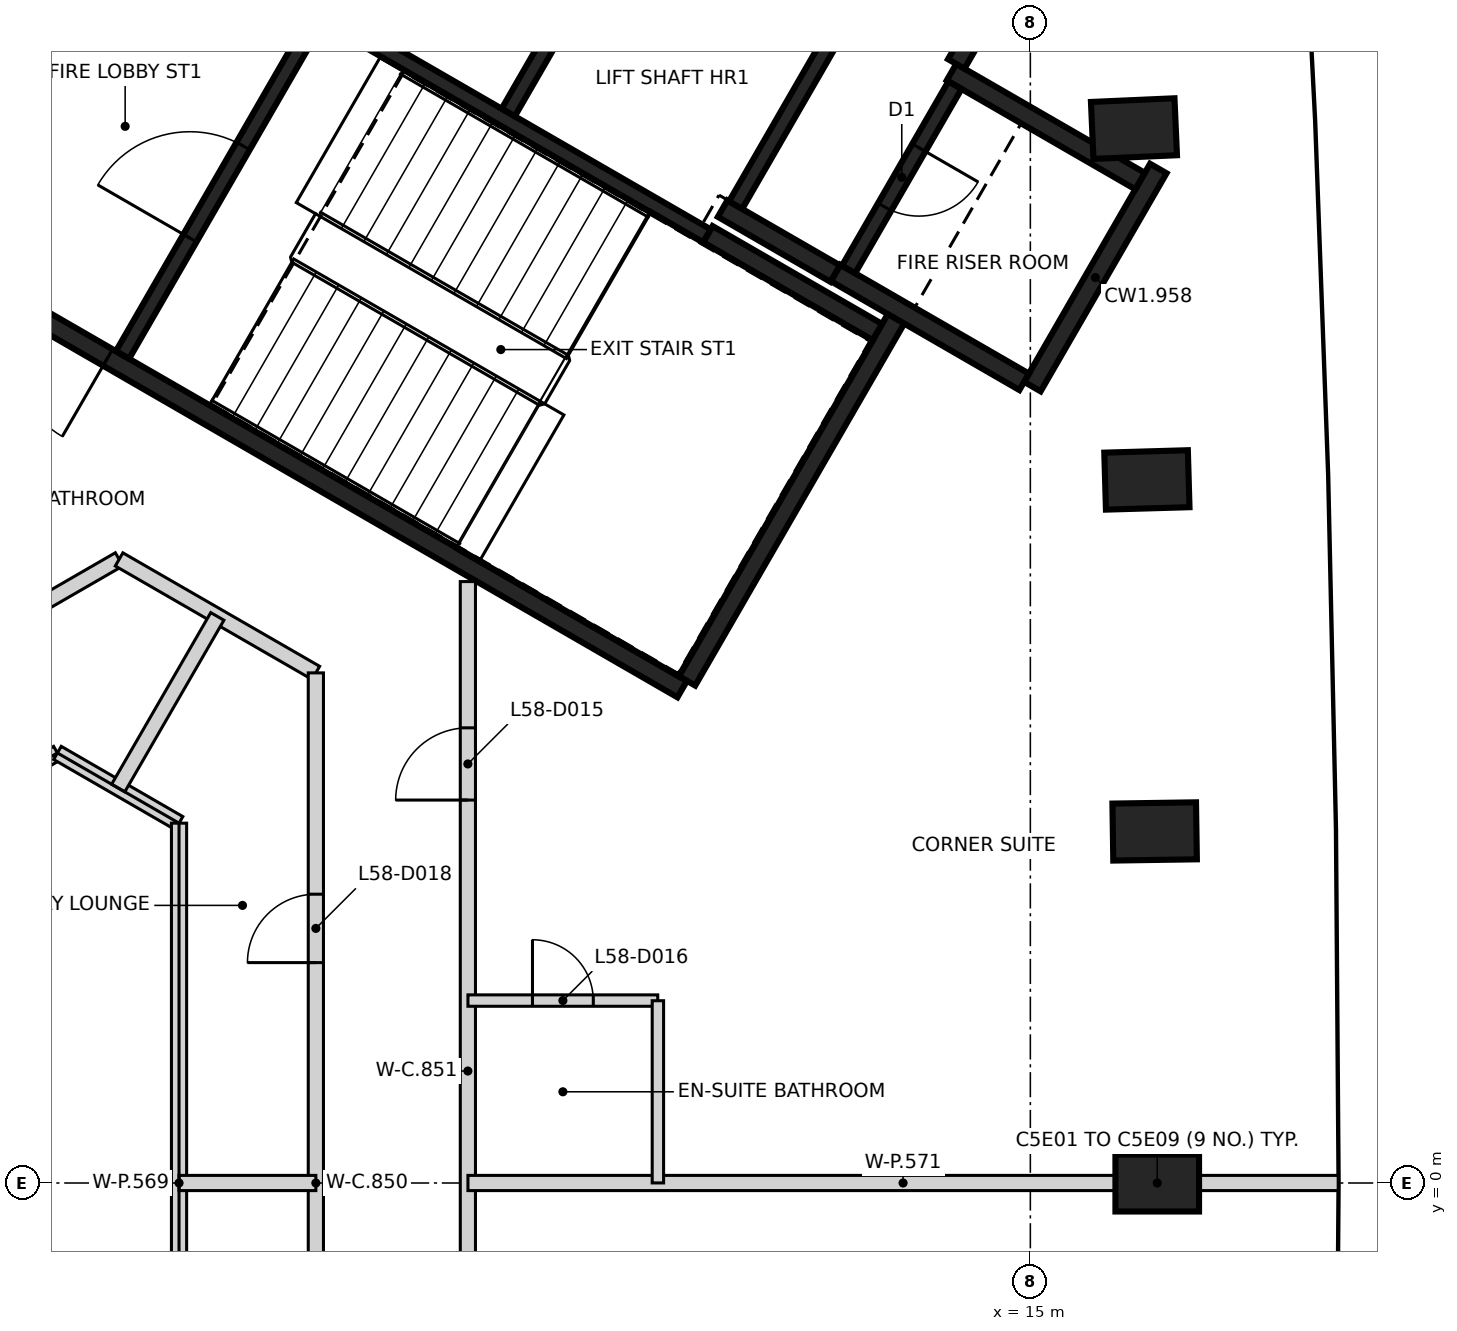
"""IFC4 building model, lengths in metres.
Left out: names, types, materials, properties, quantities, classifications, styles, units other than length and angle.
Written with IfcOpenShell. Run it as: python <this file> out.ifc"""

import sys

from ifc_helpers import new_model, si_unit, direction, frame, frame_2d, origin, origin_2d, place, context, subcontext, project, spatial, rectangle, extrude, element, fill, save


model = new_model("IFC4")
c1 = context("Model", 3, precision=1e-05, world=origin(), true_north=direction((0.0, 1.0)))
c2 = subcontext(c1, "Body", "Model", "MODEL_VIEW")
j1 = project(units=[si_unit("LENGTHUNIT", "METRE"), si_unit("PLANEANGLEUNIT", "RADIAN")], contexts=[c1])
p1 = place(None, origin())
s1 = spatial("IfcSite", under=j1, at=p1, CompositionType="ELEMENT")
p2 = place(p1, origin())
s2 = spatial("IfcBuilding", under=s1, at=p2, CompositionType="ELEMENT")
p3 = place(p2, frame((0.0, 0.0, 232.2)))
s3 = spatial("IfcBuildingStorey", under=s2, at=p3, CompositionType="ELEMENT", Elevation=232.2)
for number, where, z_axis, x_axis in (
    (1, (16.669, 0.0, -0.35), (0.0, 0.0, 1.0), (1.0, 0.0, 0.0)),
    (2, (16.635, 4.625, -0.35), (0.0, 0.0, 1.0), (1.0, 0.015, 0.0)),
    (3, (16.533, 9.25, -0.35), (0.0, 0.0, 1.0), (1.0, 0.029, 0.0)),
    (4, (16.363, 13.872, -0.35), (0.0, 0.0, 1.0), (0.999, 0.044, 0.0)),
):
    element("IfcColumn", number, at=place(p3, frame(where, z_axis=z_axis, x_axis=x_axis)), inside=s3, PredefinedType="COLUMN", context=c2, shape_type="SweptSolid", body=[
        extrude(rectangle(XDim=1.1, YDim=0.75, at=origin_2d()), origin(), (0.0, 0.0, 1.0), 3.6),
    ])
p4 = place(p3, frame((10.42, 6.498, 0.0), z_axis=(0.0, 0.0, 1.0), x_axis=(-0.866021906294, 0.500006057782, 0.0)))
e5 = element("IfcWall", 5, at=p4, inside=s3, PredefinedType="SHEAR", context=c2, shape_type="SweptSolid", body=[
    extrude(rectangle(XDim=11.55, YDim=0.25, at=frame_2d((5.775, 0.0))), origin(), (0.0, 0.0, 1.0), 3.25),
])
p5 = place(p4, frame((10.025, 0.0, 0.0)))
e6 = element("IfcOpeningElement", 6, at=p5, cuts=e5, PredefinedType="OPENING", context=c2, shape_type="SweptSolid", body=[
    extrude(rectangle(XDim=1.2, YDim=2.1, at=frame_2d((0.6, 1.05))), frame((0.0, 0.135, 0.0), z_axis=(0.0, -1.0, 0.0), x_axis=(1.0, 0.0, 0.0)), (0.0, 0.0, 1.0), 0.27),
])
p6 = place(p4, frame((8.725, 0.0, 0.0)))
e7 = element("IfcOpeningElement", 7, at=p6, cuts=e5, PredefinedType="OPENING", context=c2, shape_type="SweptSolid", body=[
    extrude(rectangle(XDim=1.2, YDim=2.1, at=frame_2d((0.6, 1.05))), frame((0.0, 0.135, 0.0), z_axis=(0.0, -1.0, 0.0), x_axis=(1.0, 0.0, 0.0)), (0.0, 0.0, 1.0), 0.27),
])
p7 = place(p3, frame((0.48, 12.381, 0.0), z_axis=(0.0, 0.0, 1.0), x_axis=(0.49999885962, 0.866026062182, 0.0)))
e8 = element("IfcWall", 8, at=p7, inside=s3, PredefinedType="SHEAR", context=c2, shape_type="SweptSolid", body=[
    extrude(rectangle(XDim=5.225, YDim=0.25, at=frame_2d((2.612, 0.0))), origin(), (0.0, 0.0, 1.0), 3.25),
])
p8 = place(p3, frame((13.238, 11.378, 0.0), z_axis=(0.0, 0.0, 1.0), x_axis=(-0.500008851346, -0.866020293397, 0.0)))
e9 = element("IfcWall", 9, at=p8, inside=s3, PredefinedType="SHEAR", context=c2, shape_type="SweptSolid", body=[
    extrude(rectangle(XDim=5.51, YDim=0.25, at=frame_2d((2.755, 0.0))), origin(), (0.0, 0.0, 1.0), 3.25),
])
p9 = place(p3, frame((16.684, 13.347, 0.0), z_axis=(0.0, 0.0, 1.0), x_axis=(-0.499998874531, -0.866026053573, 0.0)))
e10 = element("IfcWall", 10, at=p9, inside=s3, PredefinedType="SHEAR", context=c2, shape_type="SweptSolid", body=[
    extrude(rectangle(XDim=3.313, YDim=0.25, at=frame_2d((1.656, 0.0))), origin(), (0.0, 0.0, 1.0), 3.25),
])
p10 = place(p3, frame((14.918, 10.54, 0.0), z_axis=(0.0, 0.0, 1.0), x_axis=(-0.866063538972, 0.499933942099, 0.0)))
e11 = element("IfcWall", 11, at=p10, inside=s3, PredefinedType="SHEAR", context=c2, shape_type="SweptSolid", body=[
    extrude(rectangle(XDim=2.865, YDim=0.25, at=frame_2d((1.432, 0.0))), origin(), (0.0, 0.0, 1.0), 3.25),
])
p11 = place(p3, frame((13.963, 14.614, 0.0), z_axis=(0.0, 0.0, 1.0), x_axis=(0.866042235819, -0.499970844928, 0.0)))
e12 = element("IfcWall", 12, at=p11, inside=s3, PredefinedType="SHEAR", context=c2, shape_type="SweptSolid", body=[
    extrude(rectangle(XDim=2.865, YDim=0.25, at=frame_2d((1.432, 0.0))), origin(), (0.0, 0.0, 1.0), 3.25),
])
p12 = place(p3, frame((10.757, 12.481, 0.0), z_axis=(0.0, 0.0, 1.0), x_axis=(0.866022940537, -0.500004266446, 0.0)))
e13 = element("IfcWall", 13, at=p12, inside=s3, PredefinedType="SHEAR", context=c2, shape_type="SweptSolid", body=[
    extrude(rectangle(XDim=2.575, YDim=0.25, at=frame_2d((1.287, 0.0))), origin(), (0.0, 0.0, 1.0), 3.25),
])
p13 = place(p3, frame((12.433, 11.964, 0.0), z_axis=(0.0, 0.0, 1.0), x_axis=(-0.866038183914, 0.499977863513, 0.0)))
e14 = element("IfcWall", 14, at=p13, inside=s3, PredefinedType="SHEAR", context=c2, shape_type="SweptSolid", body=[
    extrude(rectangle(XDim=1.71, YDim=0.25, at=frame_2d((0.855, 0.0))), origin(), (0.0, 0.0, 1.0), 3.25),
])
p14 = place(p3, frame((14.305, 15.207, 0.0), z_axis=(0.0, 0.0, 1.0), x_axis=(-0.499848422343, -0.866112899501, 0.0)))
e15 = element("IfcWall", 15, at=p14, inside=s3, PredefinedType="SHEAR", context=c2, shape_type="SweptSolid", body=[
    extrude(rectangle(XDim=0.559, YDim=0.25, at=frame_2d((0.28, 0.0))), origin(), (0.0, 0.0, 1.0), 3.25),
])
p15 = place(p3, frame((10.743, 12.46, 0.0), z_axis=(0.0, 0.0, 1.0), x_axis=(-0.866018848283, 0.500011354289, 0.0)))
e16 = element("IfcWall", 16, at=p15, inside=s3, PredefinedType="SHEAR", context=c2, shape_type="SweptSolid", body=[
    extrude(rectangle(XDim=5.974, YDim=0.2, at=frame_2d((2.987, 0.0))), origin(), (0.0, 0.0, 1.0), 3.25),
])
p16 = place(p3, frame((3.057, 10.895, 0.0), z_axis=(0.0, 0.0, 1.0), x_axis=(0.500027839223, 0.866009330205, 0.0)))
e17 = element("IfcWall", 17, at=p16, inside=s3, PredefinedType="SHEAR", context=c2, shape_type="SweptSolid", body=[
    extrude(rectangle(XDim=5.098, YDim=0.2, at=frame_2d((2.549, 0.0))), origin(), (0.0, 0.0, 1.0), 3.25),
])
p17 = place(p16, frame((1.774, 0.0, 0.0)))
e18 = element("IfcOpeningElement", 18, at=p17, cuts=e17, PredefinedType="OPENING", context=c2, shape_type="SweptSolid", body=[
    extrude(rectangle(XDim=1.4, YDim=2.1, at=frame_2d((0.7, 1.05))), frame((0.0, 0.11, 0.0), z_axis=(0.0, -1.0, 0.0), x_axis=(1.0, 0.0, 0.0)), (0.0, 0.0, 1.0), 0.22),
])
p18 = place(p3, frame((8.132, 14.084, 0.0), z_axis=(0.0, 0.0, 1.0), x_axis=(0.500030834389, 0.86600760081, 0.0)))
e19 = element("IfcWall", 19, at=p18, inside=s3, PredefinedType="SHEAR", context=c2, shape_type="SweptSolid", body=[
    extrude(rectangle(XDim=3.198, YDim=0.2, at=frame_2d((1.599, 0.0))), origin(), (0.0, 0.0, 1.0), 3.25),
])
p19 = place(p3, frame((14.008, 14.442, 0.0), z_axis=(0.0, 0.0, 1.0), x_axis=(-0.499986818241, -0.866033014143, 0.0)))
e20 = element("IfcWall", 20, at=p19, inside=s3, PredefinedType="SHEAR", context=c2, shape_type="SweptSolid", body=[
    extrude(rectangle(XDim=2.798, YDim=0.2, at=frame_2d((1.399, 0.0))), origin(), (0.0, 0.0, 1.0), 3.25),
])
p20 = place(p19, frame((0.949, 0.0, 0.0)))
e21 = element("IfcOpeningElement", 21, at=p20, cuts=e20, PredefinedType="OPENING", context=c2, shape_type="SweptSolid", body=[
    extrude(rectangle(XDim=0.9, YDim=2.1, at=frame_2d((0.45, 1.05))), frame((0.0, 0.11, 0.0), z_axis=(0.0, -1.0, 0.0), x_axis=(1.0, 0.0, 0.0)), (0.0, 0.0, 1.0), 0.22),
])
p21 = place(p3, frame((12.502, 15.255, 0.0), z_axis=(0.0, 0.0, 1.0), x_axis=(-0.499965018551, -0.866045599391, 0.0)))
e22 = element("IfcWall", 22, at=p21, inside=s3, PredefinedType="SHEAR", context=c2, shape_type="SweptSolid", body=[
    extrude(rectangle(XDim=2.759, YDim=0.2, at=frame_2d((1.379, 0.0))), origin(), (0.0, 0.0, 1.0), 3.25),
])
p22 = place(p3, frame((-8.612, 1.494, 0.0), z_axis=(0.0, 0.0, 1.0), x_axis=(0.8660441356, 0.49996755414, 0.0)))
e23 = element("IfcWall", 23, at=p22, inside=s3, PredefinedType="PARTITIONING", context=c2, shape_type="SweptSolid", body=[
    extrude(rectangle(XDim=13.422, YDim=0.2, at=frame_2d((6.711, 0.0))), origin(), (0.0, 0.0, 1.0), 3.25),
])
p23 = place(p22, frame((9.611, 0.0, 0.0)))
e24 = element("IfcOpeningElement", 24, at=p23, cuts=e23, PredefinedType="OPENING", context=c2, shape_type="SweptSolid", body=[
    extrude(rectangle(XDim=0.9, YDim=2.1, at=frame_2d((0.45, 1.05))), frame((0.0, 0.11, 0.0), z_axis=(0.0, -1.0, 0.0), x_axis=(1.0, 0.0, 0.0)), (0.0, 0.0, 1.0), 0.22),
])
p24 = place(p22, frame((2.911, 0.0, 0.0)))
e25 = element("IfcOpeningElement", 25, at=p24, cuts=e23, PredefinedType="OPENING", context=c2, shape_type="SweptSolid", body=[
    extrude(rectangle(XDim=0.9, YDim=2.1, at=frame_2d((0.45, 1.05))), frame((0.0, 0.11, 0.0), z_axis=(0.0, -1.0, 0.0), x_axis=(1.0, 0.0, 0.0)), (0.0, 0.0, 1.0), 0.22),
])
p25 = place(p3, frame((-1.084, 12.65, 0.0), z_axis=(0.0, 0.0, 1.0), x_axis=(0.492373019537, 0.87038428848, 0.0)))
e26 = element("IfcWall", 26, at=p25, inside=s3, PredefinedType="PARTITIONING", context=c2, shape_type="SweptSolid", body=[
    extrude(rectangle(XDim=8.738, YDim=0.2, at=frame_2d((4.369, 0.0))), origin(), (0.0, 0.0, 1.0), 3.25),
])
p26 = place(p25, frame((5.23, 0.0, 0.0)))
e27 = element("IfcOpeningElement", 27, at=p26, cuts=e26, PredefinedType="OPENING", context=c2, shape_type="SweptSolid", body=[
    extrude(rectangle(XDim=1.0, YDim=2.1, at=frame_2d((0.5, 1.05))), frame((0.0, 0.11, 0.0), z_axis=(0.0, -1.0, 0.0), x_axis=(1.0, 0.0, 0.0)), (0.0, 0.0, 1.0), 0.22),
])
p27 = place(p3, frame((3.011, 8.204, 0.0), z_axis=(0.0, 0.0, 1.0), x_axis=(0.86628077395, -0.499557424812, 0.0)))
e28 = element("IfcWall", 28, at=p27, inside=s3, PredefinedType="PARTITIONING", context=c2, shape_type="SweptSolid", body=[
    extrude(rectangle(XDim=2.989, YDim=0.2, at=frame_2d((1.494, 0.0))), origin(), (0.0, 0.0, 1.0), 3.25),
])
p28 = place(p3, frame((5.6, -6.711, 0.0), z_axis=(0.0, 0.0, 1.0), x_axis=(0.0, 1.0, 0.0)))
e29 = element("IfcWall", 29, at=p28, inside=s3, PredefinedType="PARTITIONING", context=c2, shape_type="SweptSolid", body=[
    extrude(rectangle(XDim=13.422, YDim=0.2, at=frame_2d((6.711, 0.0))), origin(), (0.0, 0.0, 1.0), 3.25),
])
p29 = place(p28, frame((2.912, 0.0, 0.0)))
e30 = element("IfcOpeningElement", 30, at=p29, cuts=e29, PredefinedType="OPENING", context=c2, shape_type="SweptSolid", body=[
    extrude(rectangle(XDim=0.9, YDim=2.1, at=frame_2d((0.45, 1.05))), frame((0.0, 0.11, 0.0), z_axis=(0.0, -1.0, 0.0), x_axis=(1.0, 0.0, 0.0)), (0.0, 0.0, 1.0), 0.22),
])
p30 = place(p28, frame((9.611, 0.0, 0.0)))
e31 = element("IfcOpeningElement", 31, at=p30, cuts=e29, PredefinedType="OPENING", context=c2, shape_type="SweptSolid", body=[
    extrude(rectangle(XDim=0.9, YDim=2.1, at=frame_2d((0.45, 1.05))), frame((0.0, 0.11, 0.0), z_axis=(0.0, -1.0, 0.0), x_axis=(1.0, 0.0, 0.0)), (0.0, 0.0, 1.0), 0.22),
])
p31 = place(p3, frame((7.6, -4.966, 0.0), z_axis=(0.0, 0.0, 1.0), x_axis=(0.0, 1.0, 0.0)))
e32 = element("IfcWall", 32, at=p31, inside=s3, PredefinedType="PARTITIONING", context=c2, shape_type="SweptSolid", body=[
    extrude(rectangle(XDim=12.878, YDim=0.2, at=frame_2d((6.439, 0.0))), origin(), (0.0, 0.0, 1.0), 3.25),
])
p32 = place(p31, frame((10.004, 0.0, 0.0)))
e33 = element("IfcOpeningElement", 33, at=p32, cuts=e32, PredefinedType="OPENING", context=c2, shape_type="SweptSolid", body=[
    extrude(rectangle(XDim=0.95, YDim=2.1, at=frame_2d((0.475, 1.05))), frame((0.0, 0.11, 0.0), z_axis=(0.0, -1.0, 0.0), x_axis=(1.0, 0.0, 0.0)), (0.0, 0.0, 1.0), 0.22),
])
p33 = place(p3, frame((-6.0, -0.924, 0.0), z_axis=(0.0, 0.0, 1.0), x_axis=(0.866223755075, -0.499656288007, 0.0)))
e34 = element("IfcWall", 34, at=p33, inside=s3, PredefinedType="PARTITIONING", context=c2, shape_type="SweptSolid", body=[
    extrude(rectangle(XDim=9.37, YDim=0.2, at=frame_2d((4.685, 0.0))), origin(), (0.0, 0.0, 1.0), 3.25),
])
p34 = place(p3, frame((-6.0, 0.924, 0.0), z_axis=(0.0, 0.0, 1.0), x_axis=(0.866012967051, 0.500021540435, 0.0)))
e35 = element("IfcWall", 35, at=p34, inside=s3, PredefinedType="PARTITIONING", context=c2, shape_type="SweptSolid", body=[
    extrude(rectangle(XDim=9.468, YDim=0.2, at=frame_2d((4.734, 0.0))), origin(), (0.0, 0.0, 1.0), 3.25),
])
p35 = place(p3, frame((2.2, 5.658, 0.0), z_axis=(0.0, 0.0, 1.0), x_axis=(0.865818011038, -0.500359042851, 0.0)))
e36 = element("IfcWall", 36, at=p35, inside=s3, PredefinedType="PARTITIONING", context=c2, shape_type="SweptSolid", body=[
    extrude(rectangle(XDim=1.848, YDim=0.2, at=frame_2d((0.924, 0.0))), origin(), (0.0, 0.0, 1.0), 3.25),
])
p36 = place(p3, frame((3.0, 5.196, 0.0), z_axis=(0.0, 0.0, 1.0), x_axis=(0.500076354988, 0.865981315724, 0.0)))
e37 = element("IfcWall", 37, at=p36, inside=s3, PredefinedType="PARTITIONING", context=c2, shape_type="SweptSolid", body=[
    extrude(rectangle(XDim=2.607, YDim=0.2, at=frame_2d((1.304, 0.0))), origin(), (0.0, 0.0, 1.0), 3.25),
])
p37 = place(p3, frame((3.8, -4.734, 0.0), z_axis=(0.0, 0.0, 1.0), x_axis=(0.0, 1.0, 0.0)))
e38 = element("IfcWall", 38, at=p37, inside=s3, PredefinedType="PARTITIONING", context=c2, shape_type="SweptSolid", body=[
    extrude(rectangle(XDim=9.468, YDim=0.2, at=frame_2d((4.734, 0.0))), origin(), (0.0, 0.0, 1.0), 3.25),
])
p38 = place(p3, frame((3.8, 0.0, 0.0), z_axis=(0.0, 0.0, 1.0), x_axis=(1.0, 0.0, 0.0)))
e39 = element("IfcWall", 39, at=p38, inside=s3, PredefinedType="PARTITIONING", context=c2, shape_type="SweptSolid", body=[
    extrude(rectangle(XDim=1.8, YDim=0.2, at=frame_2d((0.9, 0.0))), origin(), (0.0, 0.0, 1.0), 3.25),
])
p39 = place(p3, frame((7.601, 0.0, 0.0), z_axis=(0.0, 0.0, 1.0), x_axis=(1.0, 0.0, 0.0)))
e40 = element("IfcWall", 40, at=p39, inside=s3, PredefinedType="PARTITIONING", context=c2, shape_type="SweptSolid", body=[
    extrude(rectangle(XDim=11.449, YDim=0.2, at=frame_2d((5.725, 0.0))), origin(), (0.0, 0.0, 1.0), 3.25),
])
p40 = place(p3, frame((7.601, 2.4, 0.0), z_axis=(0.0, 0.0, 1.0), x_axis=(1.0, 0.0, 0.0)))
e41 = element("IfcWall", 41, at=p40, inside=s3, PredefinedType="PARTITIONING", context=c2, shape_type="SweptSolid", body=[
    extrude(rectangle(XDim=2.497, YDim=0.15, at=frame_2d((1.249, 0.0))), origin(), (0.0, 0.0, 1.0), 3.25),
])
p41 = place(p40, frame((0.849, 0.0, 0.0)))
e42 = element("IfcOpeningElement", 42, at=p41, cuts=e41, PredefinedType="OPENING", context=c2, shape_type="SweptSolid", body=[
    extrude(rectangle(XDim=0.8, YDim=2.1, at=frame_2d((0.4, 1.05))), frame((0.0, 0.085, 0.0), z_axis=(0.0, -1.0, 0.0), x_axis=(1.0, 0.0, 0.0)), (0.0, 0.0, 1.0), 0.17),
])
p42 = place(p3, frame((10.1, 0.001, 0.0), z_axis=(0.0, 0.0, 1.0), x_axis=(0.0, 1.0, 0.0)))
e43 = element("IfcWall", 43, at=p42, inside=s3, PredefinedType="PARTITIONING", context=c2, shape_type="SweptSolid", body=[
    extrude(rectangle(XDim=2.397, YDim=0.15, at=frame_2d((1.198, 0.0))), origin(), (0.0, 0.0, 1.0), 3.25),
])
p43 = place(p6, origin())
e44 = element("IfcDoor", 44, at=p43, inside=s3, OperationType="SINGLE_SWING_RIGHT", PredefinedType="DOOR", context=c2, shape_type="SweptSolid", body=[
    extrude(rectangle(XDim=1.2, YDim=2.1, at=frame_2d((0.6, 1.05))), frame((0.0, 0.025, 0.0), z_axis=(0.0, -1.0, 0.0), x_axis=(1.0, 0.0, 0.0)), (0.0, 0.0, 1.0), 0.05),
])
fill(e7, e44)
p44 = place(p17, origin())
e45 = element("IfcDoor", 45, at=p44, inside=s3, OperationType="SINGLE_SWING_RIGHT", PredefinedType="DOOR", context=c2, shape_type="SweptSolid", body=[
    extrude(rectangle(XDim=1.4, YDim=2.1, at=frame_2d((0.7, 1.05))), frame((0.0, 0.025, 0.0), z_axis=(0.0, -1.0, 0.0), x_axis=(1.0, 0.0, 0.0)), (0.0, 0.0, 1.0), 0.05),
])
fill(e18, e45)
p45 = place(p20, origin())
e46 = element("IfcDoor", 46, at=p45, inside=s3, OperationType="SINGLE_SWING_LEFT", PredefinedType="DOOR", context=c2, shape_type="SweptSolid", body=[
    extrude(rectangle(XDim=0.9, YDim=2.1, at=frame_2d((0.45, 1.05))), frame((0.0, 0.025, 0.0), z_axis=(0.0, -1.0, 0.0), x_axis=(1.0, 0.0, 0.0)), (0.0, 0.0, 1.0), 0.05),
])
fill(e21, e46)
p46 = place(p32, frame((0.95, 0.0, 0.0), z_axis=(0.0, 0.0, 1.0), x_axis=(-1.0, 0.0, 0.0)))
e47 = element("IfcDoor", 47, at=p46, inside=s3, OperationType="SINGLE_SWING_LEFT", PredefinedType="DOOR", context=c2, shape_type="SweptSolid", body=[
    extrude(rectangle(XDim=0.95, YDim=2.1, at=frame_2d((0.475, 1.05))), frame((0.0, 0.025, 0.0), z_axis=(0.0, -1.0, 0.0), x_axis=(1.0, 0.0, 0.0)), (0.0, 0.0, 1.0), 0.05),
])
fill(e33, e47)
p47 = place(p41, origin())
e48 = element("IfcDoor", 48, at=p47, inside=s3, OperationType="SINGLE_SWING_LEFT", PredefinedType="DOOR", context=c2, shape_type="SweptSolid", body=[
    extrude(rectangle(XDim=0.8, YDim=2.1, at=frame_2d((0.4, 1.05))), frame((0.0, 0.025, 0.0), z_axis=(0.0, -1.0, 0.0), x_axis=(1.0, 0.0, 0.0)), (0.0, 0.0, 1.0), 0.05),
])
fill(e42, e48)
p48 = place(p30, origin())
e49 = element("IfcDoor", 49, at=p48, inside=s3, OperationType="SINGLE_SWING_LEFT", PredefinedType="DOOR", context=c2, shape_type="SweptSolid", body=[
    extrude(rectangle(XDim=0.9, YDim=2.1, at=frame_2d((0.45, 1.05))), frame((0.0, 0.025, 0.0), z_axis=(0.0, -1.0, 0.0), x_axis=(1.0, 0.0, 0.0)), (0.0, 0.0, 1.0), 0.05),
])
fill(e31, e49)
save(model, sys.argv[1])
